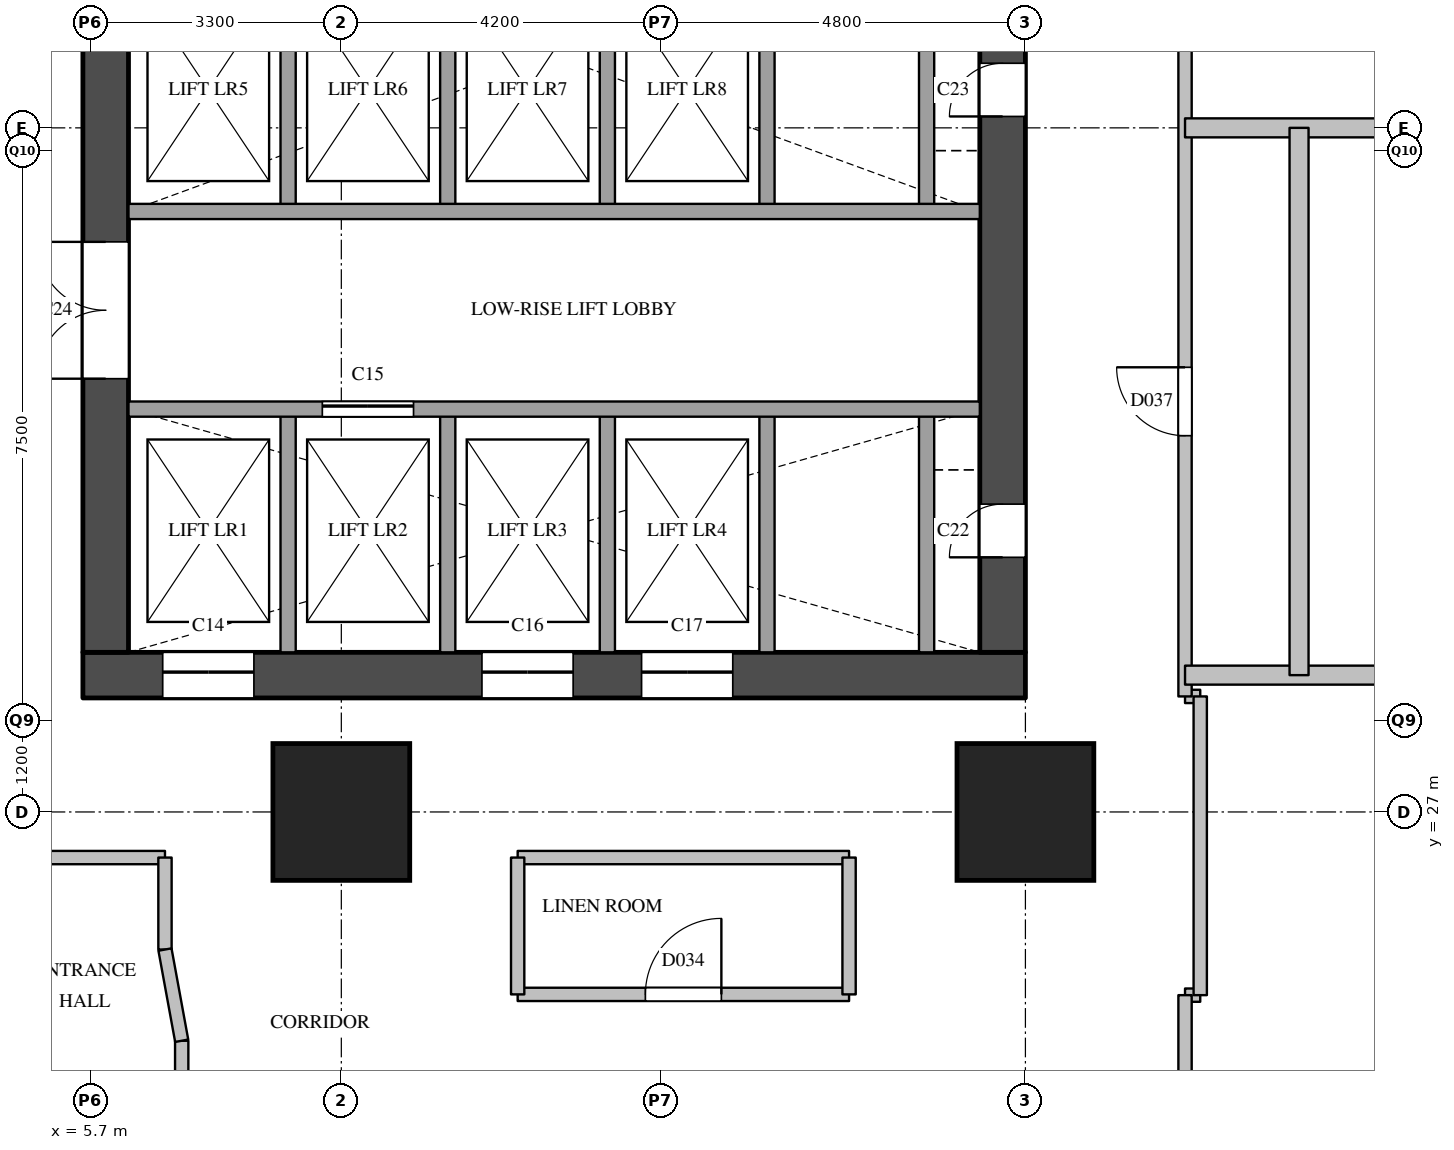
"""IFC4 building model, lengths in metres.
Left out: names, types, materials, properties, quantities, classifications, styles, units other than length and angle.
Written with IfcOpenShell. Run it as: python <this file> out.ifc"""

import sys

from ifc_helpers import new_model, si_unit, direction, frame, frame_2d, origin, origin_2d, place, context, subcontext, project, spatial, rectangle, extrude, element, fill, save


model = new_model("IFC4")
c1 = context("Model", 3, precision=1e-05, world=origin(), true_north=direction((0.0, 1.0)))
c2 = subcontext(c1, "Body", "Model", "MODEL_VIEW")
j1 = project(units=[si_unit("LENGTHUNIT", "METRE"), si_unit("PLANEANGLEUNIT", "RADIAN")], contexts=[c1])
p1 = place(None, origin())
s1 = spatial("IfcSite", under=j1, at=p1, CompositionType="ELEMENT")
p2 = place(p1, origin())
s2 = spatial("IfcBuilding", under=s1, at=p2, CompositionType="ELEMENT")
p3 = place(p2, frame((0.0, 0.0, 69.0)))
s3 = spatial("IfcBuildingStorey", under=s2, at=p3, CompositionType="ELEMENT", Elevation=69.0)
for number, where, z_axis, x_axis in (
    (1, (9.0, 27.0, 0.0), (0.0, 0.0, 1.0), (1.0, 0.0, 0.0)),
    (2, (18.0, 27.0, 0.0), (0.0, 0.0, 1.0), (1.0, 0.0, 0.0)),
):
    element("IfcColumn", number, at=place(p3, frame(where, z_axis=z_axis, x_axis=x_axis)), inside=s3, PredefinedType="COLUMN", context=c2, shape_type="SweptSolid", body=[
        extrude(rectangle(XDim=1.8, YDim=1.8, at=origin_2d()), origin(), (0.0, 0.0, 1.0), 3.8),
    ])
p4 = place(p3, frame((5.6, 28.8, 0.0), z_axis=(0.0, 0.0, 1.0), x_axis=(1.0, 0.0, 0.0)))
e3 = element("IfcWall", 3, at=p4, inside=s3, PredefinedType="SHEAR", context=c2, shape_type="SweptSolid", body=[
    extrude(rectangle(XDim=12.4, YDim=0.6, at=frame_2d((6.2, 0.0))), origin(), (0.0, 0.0, 1.0), 3.5),
])
p5 = place(p4, frame((1.05, 0.0, 0.0)))
e4 = element("IfcOpeningElement", 4, at=p5, cuts=e3, PredefinedType="OPENING", context=c2, shape_type="SweptSolid", body=[
    extrude(rectangle(XDim=1.2, YDim=2.1, at=frame_2d((0.6, 1.05))), frame((0.0, 0.31, 0.0), z_axis=(0.0, -1.0, 0.0), x_axis=(1.0, 0.0, 0.0)), (0.0, 0.0, 1.0), 0.62),
])
p6 = place(p4, frame((5.25, 0.0, 0.0)))
e5 = element("IfcOpeningElement", 5, at=p6, cuts=e3, PredefinedType="OPENING", context=c2, shape_type="SweptSolid", body=[
    extrude(rectangle(XDim=1.2, YDim=2.1, at=frame_2d((0.6, 1.05))), frame((0.0, 0.31, 0.0), z_axis=(0.0, -1.0, 0.0), x_axis=(1.0, 0.0, 0.0)), (0.0, 0.0, 1.0), 0.62),
])
p7 = place(p4, frame((7.35, 0.0, 0.0)))
e6 = element("IfcOpeningElement", 6, at=p7, cuts=e3, PredefinedType="OPENING", context=c2, shape_type="SweptSolid", body=[
    extrude(rectangle(XDim=1.2, YDim=2.1, at=frame_2d((0.6, 1.05))), frame((0.0, 0.31, 0.0), z_axis=(0.0, -1.0, 0.0), x_axis=(1.0, 0.0, 0.0)), (0.0, 0.0, 1.0), 0.62),
])
p8 = place(p3, frame((5.9, 29.1, 0.0), z_axis=(0.0, 0.0, 1.0), x_axis=(0.0, 1.0, 0.0)))
e7 = element("IfcWall", 7, at=p8, inside=s3, PredefinedType="SHEAR", context=c2, shape_type="SweptSolid", body=[
    extrude(rectangle(XDim=20.3, YDim=0.6, at=frame_2d((10.15, 0.0))), origin(), (0.0, 0.0, 1.0), 3.5),
])
p9 = place(p8, frame((3.6, 0.0, 0.0)))
e8 = element("IfcOpeningElement", 8, at=p9, cuts=e7, PredefinedType="OPENING", context=c2, shape_type="SweptSolid", body=[
    extrude(rectangle(XDim=1.8, YDim=2.1, at=frame_2d((0.9, 1.05))), frame((0.0, 0.31, 0.0), z_axis=(0.0, -1.0, 0.0), x_axis=(1.0, 0.0, 0.0)), (0.0, 0.0, 1.0), 0.62),
])
p10 = place(p8, frame((16.4, 0.0, 0.0)))
e9 = element("IfcOpeningElement", 9, at=p10, cuts=e7, PredefinedType="OPENING", context=c2, shape_type="SweptSolid", body=[
    extrude(rectangle(XDim=1.0, YDim=2.1, at=frame_2d((0.5, 1.05))), frame((0.0, 0.31, 0.0), z_axis=(0.0, -1.0, 0.0), x_axis=(1.0, 0.0, 0.0)), (0.0, 0.0, 1.0), 0.62),
])
p11 = place(p3, frame((17.7, 29.1, 0.0), z_axis=(0.0, 0.0, 1.0), x_axis=(0.0, 1.0, 0.0)))
e10 = element("IfcWall", 10, at=p11, inside=s3, PredefinedType="SHEAR", context=c2, shape_type="SweptSolid", body=[
    extrude(rectangle(XDim=20.3, YDim=0.6, at=frame_2d((10.15, 0.0))), origin(), (0.0, 0.0, 1.0), 3.5),
])
p12 = place(p11, frame((1.25, 0.0, 0.0)))
e11 = element("IfcOpeningElement", 11, at=p12, cuts=e10, PredefinedType="OPENING", context=c2, shape_type="SweptSolid", body=[
    extrude(rectangle(XDim=0.7, YDim=2.1, at=frame_2d((0.35, 1.05))), frame((0.0, 0.31, 0.0), z_axis=(0.0, -1.0, 0.0), x_axis=(1.0, 0.0, 0.0)), (0.0, 0.0, 1.0), 0.62),
])
p13 = place(p11, frame((7.05, 0.0, 0.0)))
e12 = element("IfcOpeningElement", 12, at=p13, cuts=e10, PredefinedType="OPENING", context=c2, shape_type="SweptSolid", body=[
    extrude(rectangle(XDim=0.7, YDim=2.1, at=frame_2d((0.35, 1.05))), frame((0.0, 0.31, 0.0), z_axis=(0.0, -1.0, 0.0), x_axis=(1.0, 0.0, 0.0)), (0.0, 0.0, 1.0), 0.62),
])
p14 = place(p3, frame((8.3, 29.1, 0.0), z_axis=(0.0, 0.0, 1.0), x_axis=(0.0, 1.0, 0.0)))
e13 = element("IfcWall", 13, at=p14, inside=s3, PredefinedType="SOLIDWALL", context=c2, shape_type="SweptSolid", body=[
    extrude(rectangle(XDim=3.2, YDim=0.2, at=frame_2d((1.6, 0.0))), origin(), (0.0, 0.0, 1.0), 3.5),
])
p15 = place(p3, frame((8.3, 34.9, 0.0), z_axis=(0.0, 0.0, 1.0), x_axis=(0.0, 1.0, 0.0)))
e14 = element("IfcWall", 14, at=p15, inside=s3, PredefinedType="SOLIDWALL", context=c2, shape_type="SweptSolid", body=[
    extrude(rectangle(XDim=3.2, YDim=0.2, at=frame_2d((1.6, 0.0))), origin(), (0.0, 0.0, 1.0), 3.5),
])
p16 = place(p3, frame((10.4, 29.1, 0.0), z_axis=(0.0, 0.0, 1.0), x_axis=(0.0, 1.0, 0.0)))
e15 = element("IfcWall", 15, at=p16, inside=s3, PredefinedType="SOLIDWALL", context=c2, shape_type="SweptSolid", body=[
    extrude(rectangle(XDim=3.2, YDim=0.2, at=frame_2d((1.6, 0.0))), origin(), (0.0, 0.0, 1.0), 3.5),
])
p17 = place(p3, frame((10.4, 34.9, 0.0), z_axis=(0.0, 0.0, 1.0), x_axis=(0.0, 1.0, 0.0)))
e16 = element("IfcWall", 16, at=p17, inside=s3, PredefinedType="SOLIDWALL", context=c2, shape_type="SweptSolid", body=[
    extrude(rectangle(XDim=3.2, YDim=0.2, at=frame_2d((1.6, 0.0))), origin(), (0.0, 0.0, 1.0), 3.5),
])
p18 = place(p3, frame((12.5, 29.1, 0.0), z_axis=(0.0, 0.0, 1.0), x_axis=(0.0, 1.0, 0.0)))
e17 = element("IfcWall", 17, at=p18, inside=s3, PredefinedType="SOLIDWALL", context=c2, shape_type="SweptSolid", body=[
    extrude(rectangle(XDim=3.2, YDim=0.2, at=frame_2d((1.6, 0.0))), origin(), (0.0, 0.0, 1.0), 3.5),
])
p19 = place(p3, frame((12.5, 34.9, 0.0), z_axis=(0.0, 0.0, 1.0), x_axis=(0.0, 1.0, 0.0)))
e18 = element("IfcWall", 18, at=p19, inside=s3, PredefinedType="SOLIDWALL", context=c2, shape_type="SweptSolid", body=[
    extrude(rectangle(XDim=3.2, YDim=0.2, at=frame_2d((1.6, 0.0))), origin(), (0.0, 0.0, 1.0), 3.5),
])
p20 = place(p3, frame((14.6, 29.1, 0.0), z_axis=(0.0, 0.0, 1.0), x_axis=(0.0, 1.0, 0.0)))
e19 = element("IfcWall", 19, at=p20, inside=s3, PredefinedType="SOLIDWALL", context=c2, shape_type="SweptSolid", body=[
    extrude(rectangle(XDim=3.2, YDim=0.2, at=frame_2d((1.6, 0.0))), origin(), (0.0, 0.0, 1.0), 3.5),
])
p21 = place(p3, frame((14.6, 34.9, 0.0), z_axis=(0.0, 0.0, 1.0), x_axis=(0.0, 1.0, 0.0)))
e20 = element("IfcWall", 20, at=p21, inside=s3, PredefinedType="SOLIDWALL", context=c2, shape_type="SweptSolid", body=[
    extrude(rectangle(XDim=3.2, YDim=0.2, at=frame_2d((1.6, 0.0))), origin(), (0.0, 0.0, 1.0), 3.5),
])
p22 = place(p3, frame((16.7, 29.1, 0.0), z_axis=(0.0, 0.0, 1.0), x_axis=(0.0, 1.0, 0.0)))
e21 = element("IfcWall", 21, at=p22, inside=s3, PredefinedType="SOLIDWALL", context=c2, shape_type="SweptSolid", body=[
    extrude(rectangle(XDim=3.2, YDim=0.2, at=frame_2d((1.6, 0.0))), origin(), (0.0, 0.0, 1.0), 3.5),
])
p23 = place(p3, frame((16.7, 34.9, 0.0), z_axis=(0.0, 0.0, 1.0), x_axis=(0.0, 1.0, 0.0)))
e22 = element("IfcWall", 22, at=p23, inside=s3, PredefinedType="SOLIDWALL", context=c2, shape_type="SweptSolid", body=[
    extrude(rectangle(XDim=3.2, YDim=0.2, at=frame_2d((1.6, 0.0))), origin(), (0.0, 0.0, 1.0), 3.5),
])
p24 = place(p3, frame((6.2, 32.3, 0.0), z_axis=(0.0, 0.0, 1.0), x_axis=(1.0, 0.0, 0.0)))
e23 = element("IfcWall", 23, at=p24, inside=s3, PredefinedType="SOLIDWALL", context=c2, shape_type="SweptSolid", body=[
    extrude(rectangle(XDim=11.2, YDim=0.2, at=frame_2d((5.6, 0.0))), origin(), (0.0, 0.0, 1.0), 3.5),
])
p25 = place(p24, frame((2.55, 0.0, 0.0)))
e24 = element("IfcOpeningElement", 24, at=p25, cuts=e23, PredefinedType="OPENING", context=c2, shape_type="SweptSolid", body=[
    extrude(rectangle(XDim=1.2, YDim=2.1, at=frame_2d((0.6, 1.05))), frame((0.0, 0.11, 0.0), z_axis=(0.0, -1.0, 0.0), x_axis=(1.0, 0.0, 0.0)), (0.0, 0.0, 1.0), 0.22),
])
p26 = place(p3, frame((6.2, 34.9, 0.0), z_axis=(0.0, 0.0, 1.0), x_axis=(1.0, 0.0, 0.0)))
e25 = element("IfcWall", 25, at=p26, inside=s3, PredefinedType="SOLIDWALL", context=c2, shape_type="SweptSolid", body=[
    extrude(rectangle(XDim=11.2, YDim=0.2, at=frame_2d((5.6, 0.0))), origin(), (0.0, 0.0, 1.0), 3.5),
])
p27 = place(p3, frame((20.1, 24.59, 0.0), z_axis=(0.0, 0.0, 1.0), x_axis=(1.0, 0.0, 0.0)))
e26 = element("IfcWall", 26, at=p27, inside=s3, PredefinedType="PARTITIONING", context=c2, shape_type="SweptSolid", body=[
    extrude(rectangle(XDim=0.2, YDim=0.175, at=frame_2d((0.1, 0.0))), origin(), (0.0, 0.0, 1.0), 3.5),
])
p28 = place(p3, frame((11.32, 24.6, 0.0), z_axis=(0.0, 0.0, 1.0), x_axis=(1.0, 0.0, 0.0)))
e27 = element("IfcWall", 27, at=p28, inside=s3, PredefinedType="PARTITIONING", context=c2, shape_type="SweptSolid", body=[
    extrude(rectangle(XDim=4.36, YDim=0.175, at=frame_2d((2.18, 0.0))), origin(), (0.0, 0.0, 1.0), 3.5),
])
p29 = place(p28, frame((1.68, 0.0, 0.0)))
e28 = element("IfcOpeningElement", 28, at=p29, cuts=e27, PredefinedType="OPENING", context=c2, shape_type="SweptSolid", body=[
    extrude(rectangle(XDim=1.0, YDim=2.1, at=frame_2d((0.5, 1.05))), frame((0.0, 0.097, 0.0), z_axis=(0.0, -1.0, 0.0), x_axis=(1.0, 0.0, 0.0)), (0.0, 0.0, 1.0), 0.195),
])
p30 = place(p3, frame((3.5, 26.4, 0.0), z_axis=(0.0, 0.0, 1.0), x_axis=(1.0, 0.0, 0.0)))
e29 = element("IfcWall", 29, at=p30, inside=s3, PredefinedType="PARTITIONING", context=c2, shape_type="SweptSolid", body=[
    extrude(rectangle(XDim=3.18, YDim=0.175, at=frame_2d((1.59, 0.0))), origin(), (0.0, 0.0, 1.0), 3.5),
])
p31 = place(p3, frame((11.32, 26.4, 0.0), z_axis=(0.0, 0.0, 1.0), x_axis=(1.0, 0.0, 0.0)))
e30 = element("IfcWall", 30, at=p31, inside=s3, PredefinedType="PARTITIONING", context=c2, shape_type="SweptSolid", body=[
    extrude(rectangle(XDim=4.36, YDim=0.175, at=frame_2d((2.18, 0.0))), origin(), (0.0, 0.0, 1.0), 3.5),
])
p32 = place(p3, frame((20.1, 28.52, 0.0), z_axis=(0.0, 0.0, 1.0), x_axis=(1.0, 0.0, 0.0)))
e31 = element("IfcWall", 31, at=p32, inside=s3, PredefinedType="PARTITIONING", context=c2, shape_type="SweptSolid", body=[
    extrude(rectangle(XDim=0.2, YDim=0.175, at=frame_2d((0.1, 0.0))), origin(), (0.0, 0.0, 1.0), 3.5),
])
p33 = place(p3, frame((6.68, 25.19, 0.0), z_axis=(0.0, 0.0, 1.0), x_axis=(0.0, 1.0, 0.0)))
e32 = element("IfcWall", 32, at=p33, inside=s3, PredefinedType="PARTITIONING", context=c2, shape_type="SweptSolid", body=[
    extrude(rectangle(XDim=1.21, YDim=0.175, at=frame_2d((0.605, 0.0))), origin(), (0.0, 0.0, 1.0), 3.5),
])
p34 = place(p3, frame((6.9, 6.9, 0.0), z_axis=(0.0, 0.0, 1.0), x_axis=(0.0, 1.0, 0.0)))
e33 = element("IfcWall", 33, at=p34, inside=s3, PredefinedType="PARTITIONING", context=c2, shape_type="SweptSolid", body=[
    extrude(rectangle(XDim=17.09, YDim=0.175, at=frame_2d((8.545, 0.0))), origin(), (0.0, 0.0, 1.0), 3.5),
])
p35 = place(p34, frame((6.4, 0.0, 0.0)))
e34 = element("IfcOpeningElement", 34, at=p35, cuts=e33, PredefinedType="OPENING", context=c2, shape_type="SweptSolid", body=[
    extrude(rectangle(XDim=1.0, YDim=2.1, at=frame_2d((0.5, 1.05))), frame((0.0, 0.097, 0.0), z_axis=(0.0, -1.0, 0.0), x_axis=(1.0, 0.0, 0.0)), (0.0, 0.0, 1.0), 0.195),
])
p36 = place(p34, frame((14.795, 0.0, 0.0)))
e35 = element("IfcOpeningElement", 35, at=p36, cuts=e33, PredefinedType="OPENING", context=c2, shape_type="SweptSolid", body=[
    extrude(rectangle(XDim=1.0, YDim=2.1, at=frame_2d((0.5, 1.05))), frame((0.0, 0.097, 0.0), z_axis=(0.0, -1.0, 0.0), x_axis=(1.0, 0.0, 0.0)), (0.0, 0.0, 1.0), 0.195),
])
for number, where, z_axis, x_axis in (
    (36, (11.32, 24.6, 0.0), (0.0, 0.0, 1.0), (0.0, 1.0, 0.0)),
    (37, (15.68, 24.6, 0.0), (0.0, 0.0, 1.0), (0.0, 1.0, 0.0)),
):
    element("IfcWall", number, at=place(p3, frame(where, z_axis=z_axis, x_axis=x_axis)), inside=s3, PredefinedType="PARTITIONING", context=c2, shape_type="SweptSolid", body=[
        extrude(rectangle(XDim=1.8, YDim=0.175, at=frame_2d((0.9, 0.0))), origin(), (0.0, 0.0, 1.0), 3.5),
    ])
p37 = place(p3, frame((20.1, 6.9, 0.0), z_axis=(0.0, 0.0, 1.0), x_axis=(0.0, 1.0, 0.0)))
e38 = element("IfcWall", 38, at=p37, inside=s3, PredefinedType="PARTITIONING", context=c2, shape_type="SweptSolid", body=[
    extrude(rectangle(XDim=17.69, YDim=0.175, at=frame_2d((8.845, 0.0))), origin(), (0.0, 0.0, 1.0), 3.5),
])
p38 = place(p37, frame((1.6, 0.0, 0.0)))
e39 = element("IfcOpeningElement", 39, at=p38, cuts=e38, PredefinedType="OPENING", context=c2, shape_type="SweptSolid", body=[
    extrude(rectangle(XDim=1.0, YDim=2.1, at=frame_2d((0.5, 1.05))), frame((0.0, 0.097, 0.0), z_axis=(0.0, -1.0, 0.0), x_axis=(1.0, 0.0, 0.0)), (0.0, 0.0, 1.0), 0.195),
])
p39 = place(p37, frame((5.2, 0.0, 0.0)))
e40 = element("IfcOpeningElement", 40, at=p39, cuts=e38, PredefinedType="OPENING", context=c2, shape_type="SweptSolid", body=[
    extrude(rectangle(XDim=1.0, YDim=2.1, at=frame_2d((0.5, 1.05))), frame((0.0, 0.097, 0.0), z_axis=(0.0, -1.0, 0.0), x_axis=(1.0, 0.0, 0.0)), (0.0, 0.0, 1.0), 0.195),
])
p40 = place(p37, frame((13.895, 0.0, 0.0)))
e41 = element("IfcOpeningElement", 41, at=p40, cuts=e38, PredefinedType="OPENING", context=c2, shape_type="SweptSolid", body=[
    extrude(rectangle(XDim=1.0, YDim=2.1, at=frame_2d((0.5, 1.05))), frame((0.0, 0.097, 0.0), z_axis=(0.0, -1.0, 0.0), x_axis=(1.0, 0.0, 0.0)), (0.0, 0.0, 1.0), 0.195),
])
p41 = place(p3, frame((20.1, 28.52, 0.0), z_axis=(0.0, 0.0, 1.0), x_axis=(0.0, 1.0, 0.0)))
e42 = element("IfcWall", 42, at=p41, inside=s3, PredefinedType="PARTITIONING", context=c2, shape_type="SweptSolid", body=[
    extrude(rectangle(XDim=23.58, YDim=0.175, at=frame_2d((11.79, 0.0))), origin(), (0.0, 0.0, 1.0), 3.5),
])
p42 = place(p41, frame((3.43, 0.0, 0.0)))
e43 = element("IfcOpeningElement", 43, at=p42, cuts=e42, PredefinedType="OPENING", context=c2, shape_type="SweptSolid", body=[
    extrude(rectangle(XDim=0.9, YDim=2.1, at=frame_2d((0.45, 1.05))), frame((0.0, 0.097, 0.0), z_axis=(0.0, -1.0, 0.0), x_axis=(1.0, 0.0, 0.0)), (0.0, 0.0, 1.0), 0.195),
])
p43 = place(p41, frame((15.08, 0.0, 0.0)))
e44 = element("IfcOpeningElement", 44, at=p43, cuts=e42, PredefinedType="OPENING", context=c2, shape_type="SweptSolid", body=[
    extrude(rectangle(XDim=0.9, YDim=2.1, at=frame_2d((0.45, 1.05))), frame((0.0, 0.097, 0.0), z_axis=(0.0, -1.0, 0.0), x_axis=(1.0, 0.0, 0.0)), (0.0, 0.0, 1.0), 0.195),
])
p44 = place(p3, frame((20.3, 24.59, 0.0), z_axis=(0.0, 0.0, 1.0), x_axis=(0.0, 1.0, 0.0)))
e45 = element("IfcWall", 45, at=p44, inside=s3, PredefinedType="PARTITIONING", context=c2, shape_type="SweptSolid", body=[
    extrude(rectangle(XDim=3.93, YDim=0.175, at=frame_2d((1.965, 0.0))), origin(), (0.0, 0.0, 1.0), 2.5),
])
p45 = place(p3, frame((20.1, 28.8, 0.0), z_axis=(0.0, 0.0, 1.0), x_axis=(1.0, 0.0, 0.0)))
e46 = element("IfcWall", 46, at=p45, inside=s3, PredefinedType="PARTITIONING", context=c2, shape_type="SweptSolid", body=[
    extrude(rectangle(XDim=13.8, YDim=0.25, at=frame_2d((6.9, 0.0))), origin(), (0.0, 0.0, 1.0), 2.5),
])
p46 = place(p3, frame((20.1, 36.0, 0.0), z_axis=(0.0, 0.0, 1.0), x_axis=(1.0, 0.0, 0.0)))
e47 = element("IfcWall", 47, at=p46, inside=s3, PredefinedType="PARTITIONING", context=c2, shape_type="SweptSolid", body=[
    extrude(rectangle(XDim=13.8, YDim=0.25, at=frame_2d((6.9, 0.0))), origin(), (0.0, 0.0, 1.0), 3.5),
])
p47 = place(p3, frame((21.6, 28.8, 0.0), z_axis=(0.0, 0.0, 1.0), x_axis=(0.0, 1.0, 0.0)))
e48 = element("IfcWall", 48, at=p47, inside=s3, PredefinedType="PARTITIONING", context=c2, shape_type="SweptSolid", body=[
    extrude(rectangle(XDim=7.2, YDim=0.25, at=frame_2d((3.6, 0.0))), origin(), (0.0, 0.0, 1.0), 3.5),
])
p48 = place(p3, frame((6.9, 23.99, 0.0), z_axis=(0.0, 0.0, 1.0), x_axis=(-0.180311734132, 0.983609515272, 0.0)))
e49 = element("IfcWall", 49, at=p48, inside=s3, PredefinedType="PARTITIONING", context=c2, shape_type="SweptSolid", body=[
    extrude(rectangle(XDim=1.22, YDim=0.175, at=frame_2d((0.61, 0.0))), origin(), (0.0, 0.0, 1.0), 3.5),
])
p49 = place(p5, origin())
e50 = element("IfcDoor", 50, at=p49, inside=s3, OperationType="SLIDING_TO_LEFT", PredefinedType="DOOR", context=c2, shape_type="SweptSolid", body=[
    extrude(rectangle(XDim=1.2, YDim=2.1, at=frame_2d((0.6, 1.05))), frame((0.0, 0.025, 0.0), z_axis=(0.0, -1.0, 0.0), x_axis=(1.0, 0.0, 0.0)), (0.0, 0.0, 1.0), 0.05),
])
fill(e4, e50)
p50 = place(p25, origin())
e51 = element("IfcDoor", 51, at=p50, inside=s3, OperationType="SLIDING_TO_LEFT", PredefinedType="DOOR", context=c2, shape_type="SweptSolid", body=[
    extrude(rectangle(XDim=1.2, YDim=2.1, at=frame_2d((0.6, 1.05))), frame((0.0, 0.025, 0.0), z_axis=(0.0, -1.0, 0.0), x_axis=(1.0, 0.0, 0.0)), (0.0, 0.0, 1.0), 0.05),
])
fill(e24, e51)
p51 = place(p6, origin())
e52 = element("IfcDoor", 52, at=p51, inside=s3, OperationType="SLIDING_TO_LEFT", PredefinedType="DOOR", context=c2, shape_type="SweptSolid", body=[
    extrude(rectangle(XDim=1.2, YDim=2.1, at=frame_2d((0.6, 1.05))), frame((0.0, 0.025, 0.0), z_axis=(0.0, -1.0, 0.0), x_axis=(1.0, 0.0, 0.0)), (0.0, 0.0, 1.0), 0.05),
])
fill(e5, e52)
p52 = place(p7, origin())
e53 = element("IfcDoor", 53, at=p52, inside=s3, OperationType="SLIDING_TO_LEFT", PredefinedType="DOOR", context=c2, shape_type="SweptSolid", body=[
    extrude(rectangle(XDim=1.2, YDim=2.1, at=frame_2d((0.6, 1.05))), frame((0.0, 0.025, 0.0), z_axis=(0.0, -1.0, 0.0), x_axis=(1.0, 0.0, 0.0)), (0.0, 0.0, 1.0), 0.05),
])
fill(e6, e53)
p53 = place(p12, origin())
e54 = element("IfcDoor", 54, at=p53, inside=s3, OperationType="SINGLE_SWING_LEFT", PredefinedType="DOOR", context=c2, shape_type="SweptSolid", body=[
    extrude(rectangle(XDim=0.7, YDim=2.1, at=frame_2d((0.35, 1.05))), frame((0.0, 0.025, 0.0), z_axis=(0.0, -1.0, 0.0), x_axis=(1.0, 0.0, 0.0)), (0.0, 0.0, 1.0), 0.05),
])
fill(e11, e54)
p54 = place(p13, origin())
e55 = element("IfcDoor", 55, at=p54, inside=s3, OperationType="SINGLE_SWING_LEFT", PredefinedType="DOOR", context=c2, shape_type="SweptSolid", body=[
    extrude(rectangle(XDim=0.7, YDim=2.1, at=frame_2d((0.35, 1.05))), frame((0.0, 0.025, 0.0), z_axis=(0.0, -1.0, 0.0), x_axis=(1.0, 0.0, 0.0)), (0.0, 0.0, 1.0), 0.05),
])
fill(e12, e55)
p55 = place(p9, origin())
e56 = element("IfcDoor", 56, at=p55, inside=s3, OperationType="DOUBLE_DOOR_SINGLE_SWING", PredefinedType="DOOR", context=c2, shape_type="SweptSolid", body=[
    extrude(rectangle(XDim=1.8, YDim=2.1, at=frame_2d((0.9, 1.05))), frame((0.0, 0.025, 0.0), z_axis=(0.0, -1.0, 0.0), x_axis=(1.0, 0.0, 0.0)), (0.0, 0.0, 1.0), 0.05),
])
fill(e8, e56)
p56 = place(p29, origin())
e57 = element("IfcDoor", 57, at=p56, inside=s3, OperationType="SINGLE_SWING_RIGHT", PredefinedType="DOOR", context=c2, shape_type="SweptSolid", body=[
    extrude(rectangle(XDim=1.0, YDim=2.1, at=frame_2d((0.5, 1.05))), frame((0.0, 0.025, 0.0), z_axis=(0.0, -1.0, 0.0), x_axis=(1.0, 0.0, 0.0)), (0.0, 0.0, 1.0), 0.05),
])
fill(e28, e57)
p57 = place(p42, origin())
e58 = element("IfcDoor", 58, at=p57, inside=s3, OperationType="SINGLE_SWING_RIGHT", PredefinedType="DOOR", context=c2, shape_type="SweptSolid", body=[
    extrude(rectangle(XDim=0.9, YDim=2.1, at=frame_2d((0.45, 1.05))), frame((0.0, 0.025, 0.0), z_axis=(0.0, -1.0, 0.0), x_axis=(1.0, 0.0, 0.0)), (0.0, 0.0, 1.0), 0.05),
])
fill(e43, e58)
save(model, sys.argv[1])
